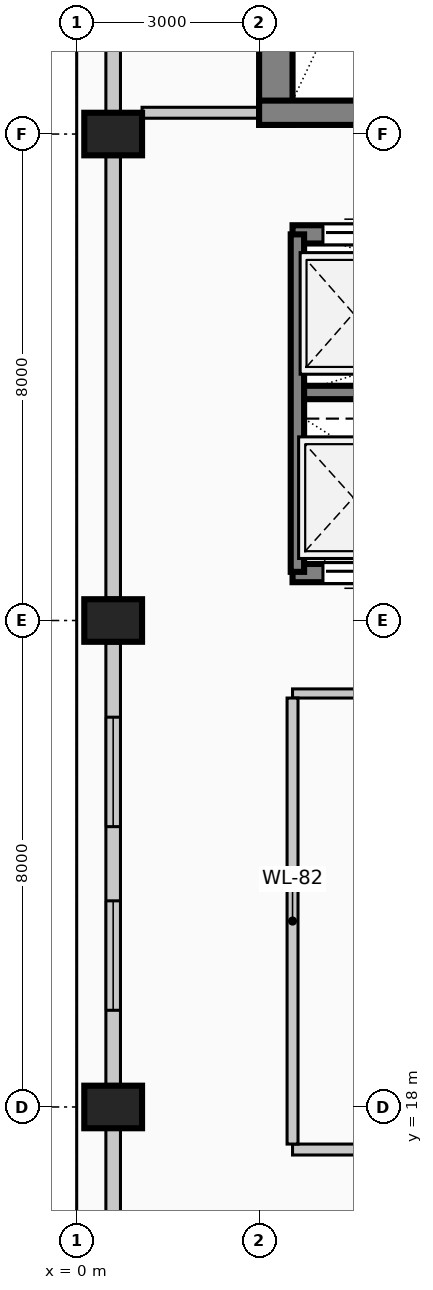
"""IFC4 building model, lengths in metres.
Left out: names, types, materials, properties, quantities, classifications, styles, units other than length and angle.
Written with IfcOpenShell. Run it as: python <this file> out.ifc"""

import sys

from ifc_helpers import new_model, si_unit, direction, frame, frame_2d, origin, origin_2d, place, context, subcontext, project, spatial, rectangle, extrude, element, fill, save


model = new_model("IFC4")
c1 = context("Model", 3, precision=1e-05, world=origin(), true_north=direction((0.0, 1.0)))
c2 = subcontext(c1, "Body", "Model", "MODEL_VIEW")
j1 = project(units=[si_unit("LENGTHUNIT", "METRE"), si_unit("PLANEANGLEUNIT", "RADIAN")], contexts=[c1])
p1 = place(None, origin())
s1 = spatial("IfcSite", under=j1, at=p1, CompositionType="ELEMENT")
p2 = place(p1, origin())
s2 = spatial("IfcBuilding", under=s1, at=p2, CompositionType="ELEMENT")
p3 = place(p2, frame((0.0, 0.0, 280.6)))
s3 = spatial("IfcBuildingStorey", under=s2, at=p3, CompositionType="ELEMENT", Elevation=280.6)
p4 = place(p3, frame((3.275, 34.15, 0.0), z_axis=(0.0, 0.0, 1.0), x_axis=(0.0, 1.0, 0.0)))
e1 = element("IfcWall", 1, at=p4, inside=s3, PredefinedType="SHEAR", context=c2, shape_type="SweptSolid", body=[
    extrude(rectangle(XDim=8.83, YDim=0.55, at=frame_2d((4.415, 0.0))), origin(), (0.0, 0.0, 1.0), 4.4),
])
p5 = place(p3, frame((3.0, 34.35, 0.0), z_axis=(0.0, 0.0, 1.0), x_axis=(1.0, 0.0, 0.0)))
e2 = element("IfcWall", 2, at=p5, inside=s3, PredefinedType="SHEAR", context=c2, shape_type="SweptSolid", body=[
    extrude(rectangle(XDim=4.71, YDim=0.4, at=frame_2d((2.355, 0.0))), origin(), (0.0, 0.0, 1.0), 4.4),
])
p6 = place(p5, frame((2.4, 0.0, 0.0)))
e3 = element("IfcOpeningElement", 3, at=p6, cuts=e2, PredefinedType="OPENING", context=c2, shape_type="SweptSolid", body=[
    extrude(rectangle(XDim=1.15, YDim=2.2, at=frame_2d((0.575, 1.1))), frame((0.0, 0.21, 0.0), z_axis=(0.0, -1.0, 0.0), x_axis=(1.0, 0.0, 0.0)), (0.0, 0.0, 1.0), 0.42),
])
for number, where, z_axis, x_axis in (
    (4, (0.6, 18.0, 0.0), (0.0, 0.0, 1.0), (0.0, 1.0, 0.0)),
    (5, (0.6, 26.0, 0.0), (0.0, 0.0, 1.0), (0.0, 1.0, 0.0)),
    (6, (0.6, 34.0, 0.0), (0.0, 0.0, 1.0), (0.0, 1.0, 0.0)),
):
    element("IfcColumn", number, at=place(p3, frame(where, z_axis=z_axis, x_axis=x_axis)), inside=s3, PredefinedType="COLUMN", context=c2, shape_type="SweptSolid", body=[
        extrude(rectangle(XDim=0.7, YDim=0.95, at=origin_2d()), origin(), (0.0, 0.0, 1.0), 4.4),
    ])
p7 = place(p3, frame((0.6, 10.37, 0.0), z_axis=(0.0, 0.0, 1.0), x_axis=(0.0, 1.0, 0.0)))
e7 = element("IfcWall", 7, at=p7, inside=s3, PredefinedType="SOLIDWALL", context=c2, shape_type="SweptSolid", body=[
    extrude(rectangle(XDim=7.26, YDim=0.24, at=frame_2d((3.63, 0.0))), origin(), (0.0, 0.0, 1.0), 3.4),
])
p8 = place(p3, frame((0.6, 18.37, 0.0), z_axis=(0.0, 0.0, 1.0), x_axis=(0.0, 1.0, 0.0)))
e8 = element("IfcWall", 8, at=p8, inside=s3, PredefinedType="SOLIDWALL", context=c2, shape_type="SweptSolid", body=[
    extrude(rectangle(XDim=7.26, YDim=0.24, at=frame_2d((3.63, 0.0))), origin(), (0.0, 0.0, 1.0), 3.4),
])
p9 = place(p8, frame((1.22, 0.0, 0.42)))
e9 = element("IfcOpeningElement", 9, at=p9, cuts=e8, PredefinedType="OPENING", context=c2, shape_type="SweptSolid", body=[
    extrude(rectangle(XDim=1.8, YDim=2.2, at=frame_2d((0.9, 1.1))), frame((0.0, 0.13, 0.0), z_axis=(0.0, -1.0, 0.0), x_axis=(1.0, 0.0, 0.0)), (0.0, 0.0, 1.0), 0.26),
])
p10 = place(p8, frame((4.24, 0.0, 0.42)))
e10 = element("IfcOpeningElement", 10, at=p10, cuts=e8, PredefinedType="OPENING", context=c2, shape_type="SweptSolid", body=[
    extrude(rectangle(XDim=1.8, YDim=2.2, at=frame_2d((0.9, 1.1))), frame((0.0, 0.13, 0.0), z_axis=(0.0, -1.0, 0.0), x_axis=(1.0, 0.0, 0.0)), (0.0, 0.0, 1.0), 0.26),
])
p11 = place(p3, frame((0.6, 26.37, 0.0), z_axis=(0.0, 0.0, 1.0), x_axis=(0.0, 1.0, 0.0)))
e11 = element("IfcWall", 11, at=p11, inside=s3, PredefinedType="SOLIDWALL", context=c2, shape_type="SweptSolid", body=[
    extrude(rectangle(XDim=7.26, YDim=0.24, at=frame_2d((3.63, 0.0))), origin(), (0.0, 0.0, 1.0), 3.4),
])
p12 = place(p3, frame((0.6, 34.37, 0.0), z_axis=(0.0, 0.0, 1.0), x_axis=(0.0, 1.0, 0.0)))
e12 = element("IfcWall", 12, at=p12, inside=s3, PredefinedType="SOLIDWALL", context=c2, shape_type="SweptSolid", body=[
    extrude(rectangle(XDim=7.66, YDim=0.24, at=frame_2d((3.83, 0.0))), origin(), (0.0, 0.0, 1.0), 3.4),
])
p13 = place(p3, frame((3.55, 32.35, 0.0), z_axis=(0.0, 0.0, 1.0), x_axis=(1.0, 0.0, 0.0)))
e13 = element("IfcWall", 13, at=p13, inside=s3, PredefinedType="SOLIDWALL", context=c2, shape_type="SweptSolid", body=[
    extrude(rectangle(XDim=2.1, YDim=0.3, at=frame_2d((1.05, 0.0))), origin(), (0.0, 0.0, 1.0), 4.4),
])
p14 = place(p13, frame((0.5, 0.0, 0.0)))
e14 = element("IfcOpeningElement", 14, at=p14, cuts=e13, PredefinedType="OPENING", context=c2, shape_type="SweptSolid", body=[
    extrude(rectangle(XDim=1.1, YDim=2.2, at=frame_2d((0.55, 1.1))), frame((0.0, 0.16, 0.0), z_axis=(0.0, -1.0, 0.0), x_axis=(1.0, 0.0, 0.0)), (0.0, 0.0, 1.0), 0.32),
])
p15 = place(p3, frame((5.65, 26.78, 0.0), z_axis=(0.0, 0.0, 1.0), x_axis=(-1.0, 0.0, 0.0)))
e15 = element("IfcWall", 15, at=p15, inside=s3, PredefinedType="SOLIDWALL", context=c2, shape_type="SweptSolid", body=[
    extrude(rectangle(XDim=2.1, YDim=0.3, at=frame_2d((1.05, 0.0))), origin(), (0.0, 0.0, 1.0), 4.4),
])
p16 = place(p15, frame((0.5, 0.0, 0.0)))
e16 = element("IfcOpeningElement", 16, at=p16, cuts=e15, PredefinedType="OPENING", context=c2, shape_type="SweptSolid", body=[
    extrude(rectangle(XDim=1.1, YDim=2.2, at=frame_2d((0.55, 1.1))), frame((0.0, 0.16, 0.0), z_axis=(0.0, -1.0, 0.0), x_axis=(1.0, 0.0, 0.0)), (0.0, 0.0, 1.0), 0.32),
])
p17 = place(p3, frame((3.55, 29.75, 0.0), z_axis=(0.0, 0.0, 1.0), x_axis=(1.0, 0.0, 0.0)))
e17 = element("IfcWall", 17, at=p17, inside=s3, PredefinedType="SOLIDWALL", context=c2, shape_type="SweptSolid", body=[
    extrude(rectangle(XDim=8.65, YDim=0.22, at=frame_2d((4.325, 0.0))), origin(), (0.0, 0.0, 1.0), 4.4),
])
p18 = place(p3, frame((3.63, 26.8, 0.0), z_axis=(0.0, 0.0, 1.0), x_axis=(0.0, 1.0, 0.0)))
e18 = element("IfcWall", 18, at=p18, inside=s3, PredefinedType="SOLIDWALL", context=c2, shape_type="SweptSolid", body=[
    extrude(rectangle(XDim=5.55, YDim=0.22, at=frame_2d((2.775, 0.0))), origin(), (0.0, 0.0, 1.0), 4.4),
])
p19 = place(p3, frame((3.55, 17.3, 0.0), z_axis=(0.0, 0.0, 1.0), x_axis=(1.0, 0.0, 0.0)))
e19 = element("IfcWall", 19, at=p19, inside=s3, PredefinedType="PARTITIONING", context=c2, shape_type="SweptSolid", body=[
    extrude(rectangle(XDim=6.25, YDim=0.18, at=frame_2d((3.125, 0.0))), origin(), (0.0, 0.0, 1.0), 4.15),
])
p20 = place(p19, frame((2.6, 0.0, 0.0)))
e20 = element("IfcOpeningElement", 20, at=p20, cuts=e19, PredefinedType="OPENING", context=c2, shape_type="SweptSolid", body=[
    extrude(rectangle(XDim=1.05, YDim=2.15, at=frame_2d((0.525, 1.075))), frame((0.0, 0.1, 0.0), z_axis=(0.0, -1.0, 0.0), x_axis=(1.0, 0.0, 0.0)), (0.0, 0.0, 1.0), 0.2),
])
p21 = place(p3, frame((3.55, 24.8, 0.0), z_axis=(0.0, 0.0, 1.0), x_axis=(1.0, 0.0, 0.0)))
e21 = element("IfcWall", 21, at=p21, inside=s3, PredefinedType="PARTITIONING", context=c2, shape_type="SweptSolid", body=[
    extrude(rectangle(XDim=6.25, YDim=0.15, at=frame_2d((3.125, 0.0))), origin(), (0.0, 0.0, 1.0), 4.15),
])
p22 = place(p3, frame((1.075, 34.35, 0.0), z_axis=(0.0, 0.0, 1.0), x_axis=(1.0, 0.0, 0.0)))
e22 = element("IfcWall", 22, at=p22, inside=s3, PredefinedType="PARTITIONING", context=c2, shape_type="SweptSolid", body=[
    extrude(rectangle(XDim=1.925, YDim=0.18, at=frame_2d((0.962, 0.0))), origin(), (0.0, 0.0, 1.0), 4.15),
])
p23 = place(p3, frame((3.55, 17.39, 0.0), z_axis=(0.0, 0.0, 1.0), x_axis=(0.0, 1.0, 0.0)))
e23 = element("IfcWall", 23, at=p23, inside=s3, PredefinedType="PARTITIONING", context=c2, shape_type="SweptSolid", body=[
    extrude(rectangle(XDim=7.335, YDim=0.18, at=frame_2d((3.667, 0.0))), origin(), (0.0, 0.0, 1.0), 4.15),
])
p24 = place(p9, origin())
e24 = element("IfcWindow", 24, at=p24, inside=s3, PartitioningType="SINGLE_PANEL", PredefinedType="WINDOW", context=c2, shape_type="SweptSolid", body=[
    extrude(rectangle(XDim=1.8, YDim=2.2, at=frame_2d((0.9, 1.1))), frame((0.0, 0.03, 0.0), z_axis=(0.0, -1.0, 0.0), x_axis=(1.0, 0.0, 0.0)), (0.0, 0.0, 1.0), 0.06),
])
fill(e9, e24)
p25 = place(p10, origin())
e25 = element("IfcWindow", 25, at=p25, inside=s3, PartitioningType="SINGLE_PANEL", PredefinedType="WINDOW", context=c2, shape_type="SweptSolid", body=[
    extrude(rectangle(XDim=1.8, YDim=2.2, at=frame_2d((0.9, 1.1))), frame((0.0, 0.03, 0.0), z_axis=(0.0, -1.0, 0.0), x_axis=(1.0, 0.0, 0.0)), (0.0, 0.0, 1.0), 0.06),
])
fill(e10, e25)
p26 = place(p14, origin())
e26 = element("IfcDoor", 26, at=p26, inside=s3, OperationType="SLIDING_TO_LEFT", PredefinedType="DOOR", context=c2, shape_type="SweptSolid", body=[
    extrude(rectangle(XDim=1.1, YDim=2.2, at=frame_2d((0.55, 1.1))), frame((0.0, 0.025, 0.0), z_axis=(0.0, -1.0, 0.0), x_axis=(1.0, 0.0, 0.0)), (0.0, 0.0, 1.0), 0.05),
])
fill(e14, e26)
p27 = place(p16, origin())
e27 = element("IfcDoor", 27, at=p27, inside=s3, OperationType="SLIDING_TO_LEFT", PredefinedType="DOOR", context=c2, shape_type="SweptSolid", body=[
    extrude(rectangle(XDim=1.1, YDim=2.2, at=frame_2d((0.55, 1.1))), frame((0.0, 0.025, 0.0), z_axis=(0.0, -1.0, 0.0), x_axis=(1.0, 0.0, 0.0)), (0.0, 0.0, 1.0), 0.05),
])
fill(e16, e27)
save(model, sys.argv[1])
